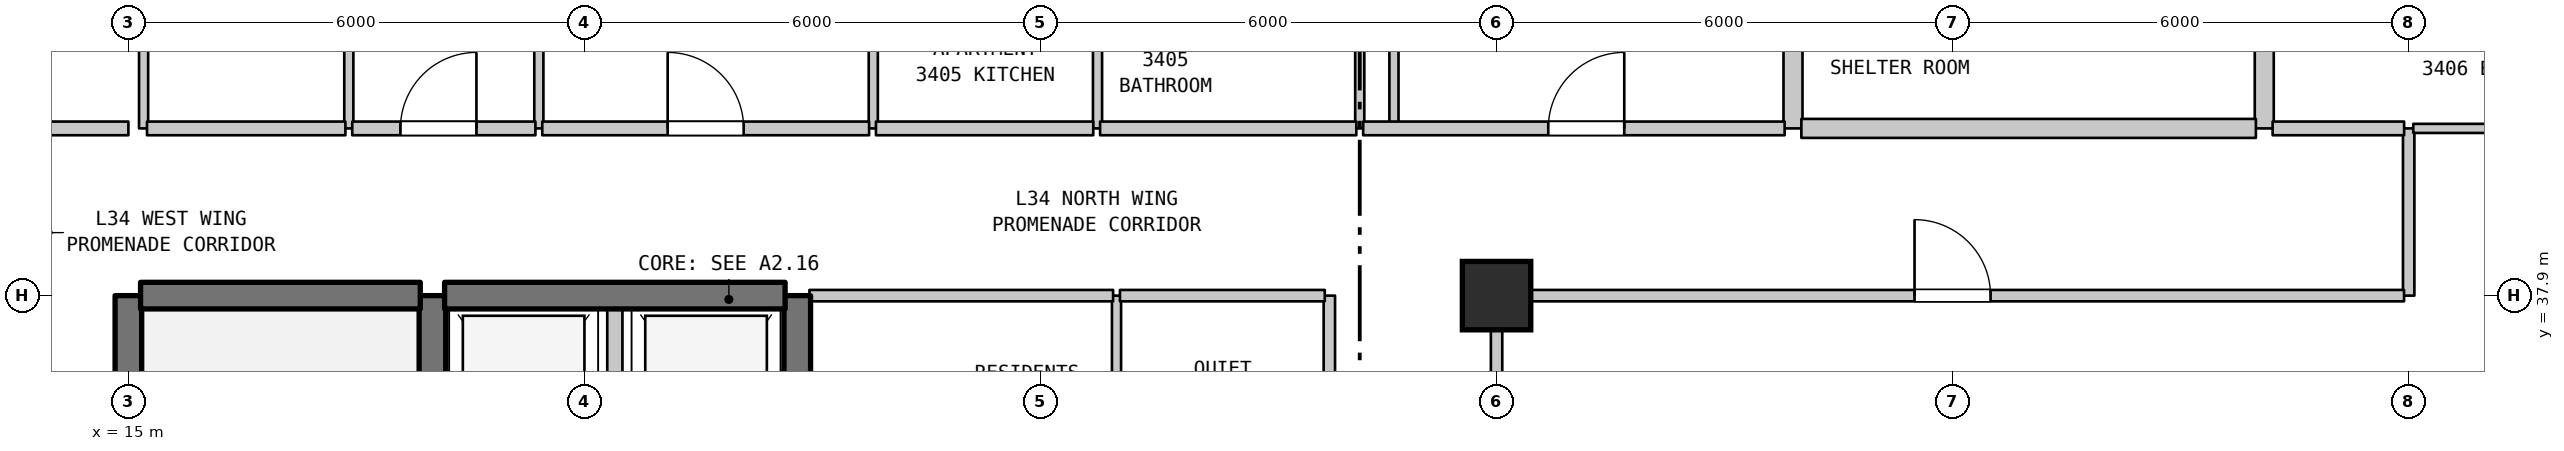
"""IFC4 building model, lengths in metres.
Left out: names, types, materials, properties, quantities, classifications, styles, units other than length and angle.
Written with IfcOpenShell. Run it as: python <this file> out.ifc"""

import sys

from ifc_helpers import new_model, si_unit, direction, frame, frame_2d, origin, origin_2d, place, context, subcontext, project, spatial, rectangle, extrude, element, fill, save


model = new_model("IFC4")
c1 = context("Model", 3, precision=1e-05, world=origin(), true_north=direction((0.0, 1.0)))
c2 = subcontext(c1, "Body", "Model", "MODEL_VIEW")
j1 = project(units=[si_unit("LENGTHUNIT", "METRE"), si_unit("PLANEANGLEUNIT", "RADIAN")], contexts=[c1])
p1 = place(None, origin())
s1 = spatial("IfcSite", under=j1, at=p1, CompositionType="ELEMENT")
p2 = place(p1, origin())
s2 = spatial("IfcBuilding", under=s1, at=p2, CompositionType="ELEMENT")
p3 = place(p2, frame((0.0, 0.0, 140.9)))
s3 = spatial("IfcBuildingStorey", under=s2, at=p3, CompositionType="ELEMENT", Elevation=140.9)
p4 = place(p3, frame((33.0, 37.9, 0.0), z_axis=(0.0, 0.0, 1.0), x_axis=(1.0, 0.0, 0.0)))
e1 = element("IfcColumn", 1, at=p4, inside=s3, PredefinedType="COLUMN", context=c2, shape_type="SweptSolid", body=[
    extrude(rectangle(XDim=0.9, YDim=0.9, at=origin_2d()), origin(), (0.0, 0.0, 1.0), 3.7),
])
p5 = place(p3, frame((15.0, 31.1, 0.0), z_axis=(0.0, 0.0, 1.0), x_axis=(0.0, 1.0, 0.0)))
e2 = element("IfcWall", 2, at=p5, inside=s3, PredefinedType="SHEAR", context=c2, shape_type="SweptSolid", body=[
    extrude(rectangle(XDim=6.8, YDim=0.35, at=frame_2d((3.4, 0.0))), origin(), (0.0, 0.0, 1.0), 3.385),
])
p6 = place(p3, frame((15.2, 40.1, 0.0), z_axis=(0.0, 0.0, 1.0), x_axis=(0.0, 1.0, 0.0)))
e3 = element("IfcWall", 3, at=p6, inside=s3, PredefinedType="PARTITIONING", context=c2, shape_type="SweptSolid", body=[
    extrude(rectangle(XDim=3.2, YDim=0.12, at=frame_2d((1.6, 0.0))), origin(), (0.0, 0.0, 1.0), 3.385),
])
p7 = place(p3, frame((17.9, 40.1, 0.0), z_axis=(0.0, 0.0, 1.0), x_axis=(0.0, 1.0, 0.0)))
e4 = element("IfcWall", 4, at=p7, inside=s3, PredefinedType="PARTITIONING", context=c2, shape_type="SweptSolid", body=[
    extrude(rectangle(XDim=3.2, YDim=0.12, at=frame_2d((1.6, 0.0))), origin(), (0.0, 0.0, 1.0), 3.385),
])
p8 = place(p7, frame((1.15, 0.0, 0.0)))
e5 = element("IfcOpeningElement", 5, at=p8, cuts=e4, PredefinedType="OPENING", context=c2, shape_type="SweptSolid", body=[
    extrude(rectangle(XDim=0.9, YDim=2.15, at=frame_2d((0.45, 1.075))), frame((0.0, 0.07, 0.0), z_axis=(0.0, -1.0, 0.0), x_axis=(1.0, 0.0, 0.0)), (0.0, 0.0, 1.0), 0.14),
])
p9 = place(p3, frame((19.0, 35.0, 0.0), z_axis=(0.0, 0.0, 1.0), x_axis=(0.0, 1.0, 0.0)))
e6 = element("IfcWall", 6, at=p9, inside=s3, PredefinedType="SHEAR", context=c2, shape_type="SweptSolid", body=[
    extrude(rectangle(XDim=2.9, YDim=0.35, at=frame_2d((1.45, 0.0))), origin(), (0.0, 0.0, 1.0), 3.385),
])
p10 = place(p3, frame((20.4, 40.1, 0.0), z_axis=(0.0, 0.0, 1.0), x_axis=(0.0, 1.0, 0.0)))
e7 = element("IfcWall", 7, at=p10, inside=s3, PredefinedType="PARTITIONING", context=c2, shape_type="SweptSolid", body=[
    extrude(rectangle(XDim=13.79, YDim=0.12, at=frame_2d((6.895, 0.0))), origin(), (0.0, 0.0, 1.0), 3.385),
])
p11 = place(p3, frame((21.4, 35.0, 0.0), z_axis=(0.0, 0.0, 1.0), x_axis=(0.0, 1.0, 0.0)))
e8 = element("IfcWall", 8, at=p11, inside=s3, PredefinedType="STANDARD", context=c2, shape_type="SweptSolid", body=[
    extrude(rectangle(XDim=2.9, YDim=0.2, at=frame_2d((1.45, 0.0))), origin(), (0.0, 0.0, 1.0), 3.385),
])
p12 = place(p3, frame((23.8, 35.0, 0.0), z_axis=(0.0, 0.0, 1.0), x_axis=(0.0, 1.0, 0.0)))
e9 = element("IfcWall", 9, at=p12, inside=s3, PredefinedType="SHEAR", context=c2, shape_type="SweptSolid", body=[
    extrude(rectangle(XDim=2.9, YDim=0.35, at=frame_2d((1.45, 0.0))), origin(), (0.0, 0.0, 1.0), 3.385),
])
for number, where, z_axis, x_axis in (
    (10, (24.8, 40.1, 0.0), (0.0, 0.0, 1.0), (0.0, 1.0, 0.0)),
    (11, (27.75, 40.1, 0.0), (0.0, 0.0, 1.0), (0.0, 1.0, 0.0)),
):
    element("IfcWall", number, at=place(p3, frame(where, z_axis=z_axis, x_axis=x_axis)), inside=s3, PredefinedType="PARTITIONING", context=c2, shape_type="SweptSolid", body=[
        extrude(rectangle(XDim=2.3, YDim=0.12, at=frame_2d((1.15, 0.0))), origin(), (0.0, 0.0, 1.0), 3.385),
    ])
p13 = place(p3, frame((28.0, 35.0, 0.0), z_axis=(0.0, 0.0, 1.0), x_axis=(0.0, 1.0, 0.0)))
e12 = element("IfcWall", 12, at=p13, inside=s3, PredefinedType="PARTITIONING", context=c2, shape_type="SweptSolid", body=[
    extrude(rectangle(XDim=2.9, YDim=0.12, at=frame_2d((1.45, 0.0))), origin(), (0.0, 0.0, 1.0), 3.385),
])
p14 = place(p3, frame((30.8, 35.0, 0.0), z_axis=(0.0, 0.0, 1.0), x_axis=(0.0, 1.0, 0.0)))
e13 = element("IfcWall", 13, at=p14, inside=s3, PredefinedType="STANDARD", context=c2, shape_type="SweptSolid", body=[
    extrude(rectangle(XDim=2.9, YDim=0.15, at=frame_2d((1.45, 0.0))), origin(), (0.0, 0.0, 1.0), 3.385),
])
p15 = place(p3, frame((31.2, 40.1, 0.0), z_axis=(0.0, 0.0, 1.0), x_axis=(0.0, 1.0, 0.0)))
e14 = element("IfcWall", 14, at=p15, inside=s3, PredefinedType="PARTITIONING", context=c2, shape_type="SweptSolid", body=[
    extrude(rectangle(XDim=2.3, YDim=0.12, at=frame_2d((1.15, 0.0))), origin(), (0.0, 0.0, 1.0), 3.385),
])
p16 = place(p3, frame((31.65, 40.1, 0.0), z_axis=(0.0, 0.0, 1.0), x_axis=(0.0, 1.0, 0.0)))
e15 = element("IfcWall", 15, at=p16, inside=s3, PredefinedType="PARTITIONING", context=c2, shape_type="SweptSolid", body=[
    extrude(rectangle(XDim=2.05, YDim=0.12, at=frame_2d((1.025, 0.0))), origin(), (0.0, 0.0, 1.0), 3.385),
])
p17 = place(p3, frame((33.0, 29.16, 0.0), z_axis=(0.0, 0.0, 1.0), x_axis=(0.0, 1.0, 0.0)))
e16 = element("IfcWall", 16, at=p17, inside=s3, PredefinedType="STANDARD", context=c2, shape_type="SweptSolid", body=[
    extrude(rectangle(XDim=8.74, YDim=0.15, at=frame_2d((4.37, 0.0))), origin(), (0.0, 0.0, 1.0), 2.885),
])
p18 = place(p17, frame((3.799, 0.0, 0.0)))
e17 = element("IfcOpeningElement", 17, at=p18, cuts=e16, PredefinedType="OPENING", context=c2, shape_type="SweptSolid", body=[
    extrude(rectangle(XDim=1.0, YDim=2.15, at=frame_2d((0.5, 1.075))), frame((0.0, 0.085, 0.0), z_axis=(0.0, -1.0, 0.0), x_axis=(1.0, 0.0, 0.0)), (0.0, 0.0, 1.0), 0.17),
])
for number, where, z_axis, x_axis in (
    (18, (36.9, 40.1, 0.0), (0.0, 0.0, 1.0), (0.0, 1.0, 0.0)),
    (19, (43.1, 40.1, 0.0), (0.0, 0.0, 1.0), (0.0, 1.0, 0.0)),
):
    element("IfcWall", number, at=place(p3, frame(where, z_axis=z_axis, x_axis=x_axis)), inside=s3, PredefinedType="STANDARD", context=c2, shape_type="SweptSolid", body=[
        extrude(rectangle(XDim=2.3, YDim=0.25, at=frame_2d((1.15, 0.0))), origin(), (0.0, 0.0, 1.0), 3.385),
    ])
p19 = place(p3, frame((45.0, 37.9, 0.0), z_axis=(0.0, 0.0, 1.0), x_axis=(0.0, 1.0, 0.0)))
e20 = element("IfcWall", 20, at=p19, inside=s3, PredefinedType="STANDARD", context=c2, shape_type="SweptSolid", body=[
    extrude(rectangle(XDim=2.2, YDim=0.15, at=frame_2d((1.1, 0.0))), origin(), (0.0, 0.0, 1.0), 3.385),
])
p20 = place(p3, frame((15.16, 37.9, 0.0), z_axis=(0.0, 0.0, 1.0), x_axis=(1.0, 0.0, 0.0)))
e21 = element("IfcWall", 21, at=p20, inside=s3, PredefinedType="SHEAR", context=c2, shape_type="SweptSolid", body=[
    extrude(rectangle(XDim=3.68, YDim=0.35, at=frame_2d((1.84, 0.0))), origin(), (0.0, 0.0, 1.0), 3.385),
])
p21 = place(p3, frame((19.16, 37.9, 0.0), z_axis=(0.0, 0.0, 1.0), x_axis=(1.0, 0.0, 0.0)))
e22 = element("IfcWall", 22, at=p21, inside=s3, PredefinedType="SHEAR", context=c2, shape_type="SweptSolid", body=[
    extrude(rectangle(XDim=4.48, YDim=0.35, at=frame_2d((2.24, 0.0))), origin(), (0.0, 0.0, 1.0), 3.385),
])
p22 = place(p3, frame((23.96, 37.9, 0.0), z_axis=(0.0, 0.0, 1.0), x_axis=(1.0, 0.0, 0.0)))
e23 = element("IfcWall", 23, at=p22, inside=s3, PredefinedType="STANDARD", context=c2, shape_type="SweptSolid", body=[
    extrude(rectangle(XDim=3.995, YDim=0.15, at=frame_2d((1.998, 0.0))), origin(), (0.0, 0.0, 1.0), 2.885),
])
p23 = place(p3, frame((28.045, 37.9, 0.0), z_axis=(0.0, 0.0, 1.0), x_axis=(1.0, 0.0, 0.0)))
e24 = element("IfcWall", 24, at=p23, inside=s3, PredefinedType="STANDARD", context=c2, shape_type="SweptSolid", body=[
    extrude(rectangle(XDim=2.695, YDim=0.15, at=frame_2d((1.348, 0.0))), origin(), (0.0, 0.0, 1.0), 2.885),
])
p24 = place(p3, frame((33.06, 37.9, 0.0), z_axis=(0.0, 0.0, 1.0), x_axis=(1.0, 0.0, 0.0)))
e25 = element("IfcWall", 25, at=p24, inside=s3, PredefinedType="STANDARD", context=c2, shape_type="SweptSolid", body=[
    extrude(rectangle(XDim=11.879, YDim=0.15, at=frame_2d((5.939, 0.0))), origin(), (0.0, 0.0, 1.0), 3.385),
])
p25 = place(p24, frame((5.439, 0.0, 0.0)))
e26 = element("IfcOpeningElement", 26, at=p25, cuts=e25, PredefinedType="OPENING", context=c2, shape_type="SweptSolid", body=[
    extrude(rectangle(XDim=1.0, YDim=2.15, at=frame_2d((0.5, 1.075))), frame((0.0, 0.085, 0.0), z_axis=(0.0, -1.0, 0.0), x_axis=(1.0, 0.0, 0.0)), (0.0, 0.0, 1.0), 0.17),
])
p26 = place(p3, frame((12.875, 40.1, 0.0), z_axis=(0.0, 0.0, 1.0), x_axis=(1.0, 0.0, 0.0)))
e27 = element("IfcWall", 27, at=p26, inside=s3, PredefinedType="STANDARD", context=c2, shape_type="SweptSolid", body=[
    extrude(rectangle(XDim=2.125, YDim=0.18, at=frame_2d((1.062, 0.0))), origin(), (0.0, 0.0, 1.0), 3.385),
])
p27 = place(p3, frame((15.245, 40.1, 0.0), z_axis=(0.0, 0.0, 1.0), x_axis=(1.0, 0.0, 0.0)))
e28 = element("IfcWall", 28, at=p27, inside=s3, PredefinedType="STANDARD", context=c2, shape_type="SweptSolid", body=[
    extrude(rectangle(XDim=2.61, YDim=0.18, at=frame_2d((1.305, 0.0))), origin(), (0.0, 0.0, 1.0), 3.385),
])
p28 = place(p3, frame((17.945, 40.1, 0.0), z_axis=(0.0, 0.0, 1.0), x_axis=(1.0, 0.0, 0.0)))
e29 = element("IfcWall", 29, at=p28, inside=s3, PredefinedType="STANDARD", context=c2, shape_type="SweptSolid", body=[
    extrude(rectangle(XDim=2.41, YDim=0.18, at=frame_2d((1.205, 0.0))), origin(), (0.0, 0.0, 1.0), 3.385),
])
p29 = place(p28, frame((0.634, 0.0, 0.0)))
e30 = element("IfcOpeningElement", 30, at=p29, cuts=e29, PredefinedType="OPENING", context=c2, shape_type="SweptSolid", body=[
    extrude(rectangle(XDim=1.0, YDim=2.15, at=frame_2d((0.5, 1.075))), frame((0.0, 0.1, 0.0), z_axis=(0.0, -1.0, 0.0), x_axis=(1.0, 0.0, 0.0)), (0.0, 0.0, 1.0), 0.2),
])
p30 = place(p3, frame((20.445, 40.1, 0.0), z_axis=(0.0, 0.0, 1.0), x_axis=(1.0, 0.0, 0.0)))
e31 = element("IfcWall", 31, at=p30, inside=s3, PredefinedType="STANDARD", context=c2, shape_type="SweptSolid", body=[
    extrude(rectangle(XDim=4.3, YDim=0.18, at=frame_2d((2.15, 0.0))), origin(), (0.0, 0.0, 1.0), 3.385),
])
p31 = place(p30, frame((1.65, 0.0, 0.0)))
e32 = element("IfcOpeningElement", 32, at=p31, cuts=e31, PredefinedType="OPENING", context=c2, shape_type="SweptSolid", body=[
    extrude(rectangle(XDim=1.0, YDim=2.15, at=frame_2d((0.5, 1.075))), frame((0.0, 0.1, 0.0), z_axis=(0.0, -1.0, 0.0), x_axis=(1.0, 0.0, 0.0)), (0.0, 0.0, 1.0), 0.2),
])
p32 = place(p3, frame((24.835, 40.1, 0.0), z_axis=(0.0, 0.0, 1.0), x_axis=(1.0, 0.0, 0.0)))
e33 = element("IfcWall", 33, at=p32, inside=s3, PredefinedType="STANDARD", context=c2, shape_type="SweptSolid", body=[
    extrude(rectangle(XDim=2.859, YDim=0.18, at=frame_2d((1.43, 0.0))), origin(), (0.0, 0.0, 1.0), 3.385),
])
p33 = place(p3, frame((27.784, 40.1, 0.0), z_axis=(0.0, 0.0, 1.0), x_axis=(1.0, 0.0, 0.0)))
e34 = element("IfcWall", 34, at=p33, inside=s3, PredefinedType="STANDARD", context=c2, shape_type="SweptSolid", body=[
    extrude(rectangle(XDim=3.371, YDim=0.18, at=frame_2d((1.686, 0.0))), origin(), (0.0, 0.0, 1.0), 3.385),
])
p34 = place(p3, frame((31.245, 40.1, 0.0), z_axis=(0.0, 0.0, 1.0), x_axis=(1.0, 0.0, 0.0)))
e35 = element("IfcWall", 35, at=p34, inside=s3, PredefinedType="STANDARD", context=c2, shape_type="SweptSolid", body=[
    extrude(rectangle(XDim=5.545, YDim=0.18, at=frame_2d((2.772, 0.0))), origin(), (0.0, 0.0, 1.0), 3.385),
])
p35 = place(p34, frame((2.435, 0.0, 0.0)))
e36 = element("IfcOpeningElement", 36, at=p35, cuts=e35, PredefinedType="OPENING", context=c2, shape_type="SweptSolid", body=[
    extrude(rectangle(XDim=1.0, YDim=2.15, at=frame_2d((0.5, 1.075))), frame((0.0, 0.1, 0.0), z_axis=(0.0, -1.0, 0.0), x_axis=(1.0, 0.0, 0.0)), (0.0, 0.0, 1.0), 0.2),
])
p36 = place(p3, frame((37.01, 40.1, 0.0), z_axis=(0.0, 0.0, 1.0), x_axis=(1.0, 0.0, 0.0)))
e37 = element("IfcWall", 37, at=p36, inside=s3, PredefinedType="STANDARD", context=c2, shape_type="SweptSolid", body=[
    extrude(rectangle(XDim=5.98, YDim=0.25, at=frame_2d((2.99, 0.0))), origin(), (0.0, 0.0, 1.0), 3.385),
])
p37 = place(p3, frame((43.21, 40.1, 0.0), z_axis=(0.0, 0.0, 1.0), x_axis=(1.0, 0.0, 0.0)))
e38 = element("IfcWall", 38, at=p37, inside=s3, PredefinedType="STANDARD", context=c2, shape_type="SweptSolid", body=[
    extrude(rectangle(XDim=1.73, YDim=0.18, at=frame_2d((0.865, 0.0))), origin(), (0.0, 0.0, 1.0), 3.385),
])
p38 = place(p3, frame((45.06, 40.1, 0.0), z_axis=(0.0, 0.0, 1.0), x_axis=(1.0, 0.0, 0.0)))
e39 = element("IfcWall", 39, at=p38, inside=s3, PredefinedType="PARTITIONING", context=c2, shape_type="SweptSolid", body=[
    extrude(rectangle(XDim=2.295, YDim=0.12, at=frame_2d((1.147, 0.0))), origin(), (0.0, 0.0, 1.0), 3.385),
])
p39 = place(p25, origin())
e40 = element("IfcDoor", 40, at=p39, inside=s3, OperationType="SINGLE_SWING_LEFT", PredefinedType="DOOR", context=c2, shape_type="SweptSolid", body=[
    extrude(rectangle(XDim=1.0, YDim=2.15, at=frame_2d((0.5, 1.075))), frame((0.0, 0.025, 0.0), z_axis=(0.0, -1.0, 0.0), x_axis=(1.0, 0.0, 0.0)), (0.0, 0.0, 1.0), 0.05),
])
fill(e26, e40)
p40 = place(p29, origin())
e41 = element("IfcDoor", 41, at=p40, inside=s3, OperationType="SINGLE_SWING_RIGHT", PredefinedType="DOOR", context=c2, shape_type="SweptSolid", body=[
    extrude(rectangle(XDim=1.0, YDim=2.15, at=frame_2d((0.5, 1.075))), frame((0.0, 0.025, 0.0), z_axis=(0.0, -1.0, 0.0), x_axis=(1.0, 0.0, 0.0)), (0.0, 0.0, 1.0), 0.05),
])
fill(e30, e41)
p41 = place(p31, origin())
e42 = element("IfcDoor", 42, at=p41, inside=s3, OperationType="SINGLE_SWING_LEFT", PredefinedType="DOOR", context=c2, shape_type="SweptSolid", body=[
    extrude(rectangle(XDim=1.0, YDim=2.15, at=frame_2d((0.5, 1.075))), frame((0.0, 0.025, 0.0), z_axis=(0.0, -1.0, 0.0), x_axis=(1.0, 0.0, 0.0)), (0.0, 0.0, 1.0), 0.05),
])
fill(e32, e42)
p42 = place(p35, origin())
e43 = element("IfcDoor", 43, at=p42, inside=s3, OperationType="SINGLE_SWING_RIGHT", PredefinedType="DOOR", context=c2, shape_type="SweptSolid", body=[
    extrude(rectangle(XDim=1.0, YDim=2.15, at=frame_2d((0.5, 1.075))), frame((0.0, 0.025, 0.0), z_axis=(0.0, -1.0, 0.0), x_axis=(1.0, 0.0, 0.0)), (0.0, 0.0, 1.0), 0.05),
])
fill(e36, e43)
save(model, sys.argv[1])
